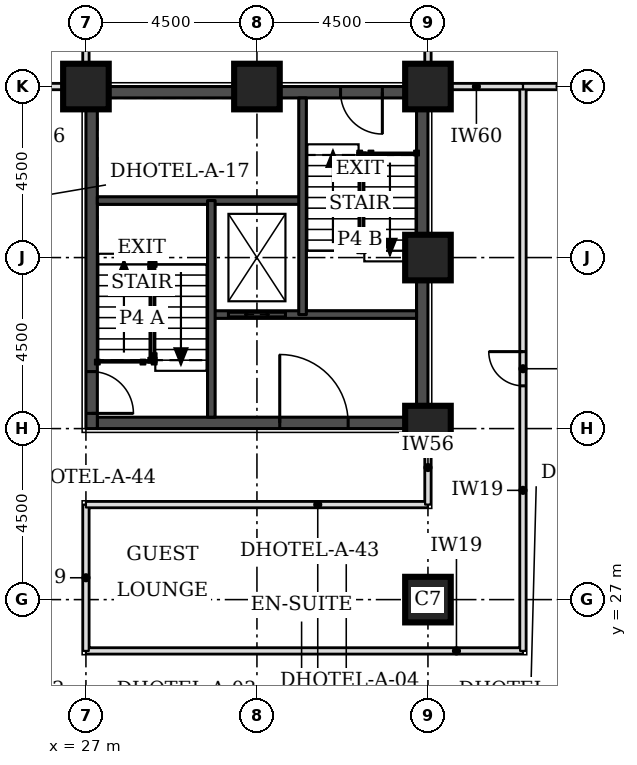
"""IFC4 building model, lengths in metres.
Left out: names, types, materials, properties, quantities, classifications, styles, units other than length and angle.
Written with IfcOpenShell. Run it as: python <this file> out.ifc"""

import sys

from ifc_helpers import new_model, si_unit, direction, frame, frame_2d, origin, origin_2d, place, context, subcontext, project, spatial, rectangle, extrude, element, fill, save


model = new_model("IFC4")
c1 = context("Model", 3, precision=1e-05, world=origin(), true_north=direction((0.0, 1.0)))
c2 = subcontext(c1, "Body", "Model", "MODEL_VIEW")
j1 = project(units=[si_unit("LENGTHUNIT", "METRE"), si_unit("PLANEANGLEUNIT", "RADIAN")], contexts=[c1])
p1 = place(None, origin())
s1 = spatial("IfcSite", under=j1, at=p1, CompositionType="ELEMENT")
p2 = place(p1, origin())
s2 = spatial("IfcBuilding", under=s1, at=p2, CompositionType="ELEMENT")
p3 = place(p2, frame((0.0, 0.0, 49.5)))
s3 = spatial("IfcBuildingStorey", under=s2, at=p3, CompositionType="ELEMENT", Elevation=49.5)
for number, where, z_axis, x_axis in (
    (1, (36.0, 27.0, 0.0), (0.0, 0.0, 1.0), (1.0, 0.0, 0.0)),
    (2, (36.0, 31.5, 0.0), (0.0, 0.0, 1.0), (1.0, 0.0, 0.0)),
    (3, (36.0, 36.0, 0.0), (0.0, 0.0, 1.0), (1.0, 0.0, 0.0)),
    (4, (27.0, 40.5, 0.0), (0.0, 0.0, 1.0), (1.0, 0.0, 0.0)),
    (5, (31.5, 40.5, 0.0), (0.0, 0.0, 1.0), (1.0, 0.0, 0.0)),
    (6, (36.0, 40.5, 0.0), (0.0, 0.0, 1.0), (1.0, 0.0, 0.0)),
):
    element("IfcColumn", number, at=place(p3, frame(where, z_axis=z_axis, x_axis=x_axis)), inside=s3, PredefinedType="COLUMN", context=c2, shape_type="SweptSolid", body=[
        extrude(rectangle(XDim=1.2, YDim=1.2, at=origin_2d()), origin(), (0.0, 0.0, 1.0), 3.3),
    ])
p4 = place(p3, frame((27.3, 31.65, 0.0), z_axis=(0.0, 0.0, 1.0), x_axis=(1.0, 0.0, 0.0)))
e7 = element("IfcWall", 7, at=p4, inside=s3, PredefinedType="SHEAR", context=c2, shape_type="SweptSolid", body=[
    extrude(rectangle(XDim=8.4, YDim=0.3, at=frame_2d((4.2, 0.0))), origin(), (0.0, 0.0, 1.0), 3.3),
])
p5 = place(p4, frame((4.8, 0.0, 0.0)))
e8 = element("IfcOpeningElement", 8, at=p5, cuts=e7, PredefinedType="OPENING", context=c2, shape_type="SweptSolid", body=[
    extrude(rectangle(XDim=1.8, YDim=2.1, at=frame_2d((0.9, 1.05))), frame((0.0, 0.16, 0.0), z_axis=(0.0, -1.0, 0.0), x_axis=(1.0, 0.0, 0.0)), (0.0, 0.0, 1.0), 0.32),
])
p6 = place(p3, frame((27.3, 40.35, 0.0), z_axis=(0.0, 0.0, 1.0), x_axis=(1.0, 0.0, 0.0)))
e9 = element("IfcWall", 9, at=p6, inside=s3, PredefinedType="SHEAR", context=c2, shape_type="SweptSolid", body=[
    extrude(rectangle(XDim=8.4, YDim=0.3, at=frame_2d((4.2, 0.0))), origin(), (0.0, 0.0, 1.0), 3.3),
])
p7 = place(p6, frame((6.4, 0.0, 0.0)))
e10 = element("IfcOpeningElement", 10, at=p7, cuts=e9, PredefinedType="OPENING", context=c2, shape_type="SweptSolid", body=[
    extrude(rectangle(XDim=1.1, YDim=2.1, at=frame_2d((0.55, 1.05))), frame((0.0, 0.16, 0.0), z_axis=(0.0, -1.0, 0.0), x_axis=(1.0, 0.0, 0.0)), (0.0, 0.0, 1.0), 0.32),
])
p8 = place(p3, frame((27.15, 31.5, 0.0), z_axis=(0.0, 0.0, 1.0), x_axis=(0.0, 1.0, 0.0)))
e11 = element("IfcWall", 11, at=p8, inside=s3, PredefinedType="SHEAR", context=c2, shape_type="SweptSolid", body=[
    extrude(rectangle(XDim=9.0, YDim=0.3, at=frame_2d((4.5, 0.0))), origin(), (0.0, 0.0, 1.0), 3.3),
])
p9 = place(p8, frame((0.4, 0.0, 0.0)))
e12 = element("IfcOpeningElement", 12, at=p9, cuts=e11, PredefinedType="OPENING", context=c2, shape_type="SweptSolid", body=[
    extrude(rectangle(XDim=1.1, YDim=2.1, at=frame_2d((0.55, 1.05))), frame((0.0, 0.16, 0.0), z_axis=(0.0, -1.0, 0.0), x_axis=(1.0, 0.0, 0.0)), (0.0, 0.0, 1.0), 0.32),
])
p10 = place(p3, frame((35.85, 31.5, 0.0), z_axis=(0.0, 0.0, 1.0), x_axis=(0.0, 1.0, 0.0)))
e13 = element("IfcWall", 13, at=p10, inside=s3, PredefinedType="SHEAR", context=c2, shape_type="SweptSolid", body=[
    extrude(rectangle(XDim=9.0, YDim=0.3, at=frame_2d((4.5, 0.0))), origin(), (0.0, 0.0, 1.0), 3.3),
])
p11 = place(p3, frame((27.0, 25.65, 0.0), z_axis=(0.0, 0.0, 1.0), x_axis=(1.0, 0.0, 0.0)))
e14 = element("IfcWall", 14, at=p11, inside=s3, PredefinedType="PARTITIONING", context=c2, shape_type="SweptSolid", body=[
    extrude(rectangle(XDim=11.5, YDim=0.15, at=frame_2d((5.75, 0.0))), origin(), (0.0, 0.0, 1.0), 3.08),
])
p12 = place(p3, frame((27.0, 25.65, 0.0), z_axis=(0.0, 0.0, 1.0), x_axis=(0.0, 1.0, 0.0)))
e15 = element("IfcWall", 15, at=p12, inside=s3, PredefinedType="PARTITIONING", context=c2, shape_type="SweptSolid", body=[
    extrude(rectangle(XDim=3.85, YDim=0.15, at=frame_2d((1.925, 0.0))), origin(), (0.0, 0.0, 1.0), 3.08),
])
p13 = place(p3, frame((38.5, 25.65, 0.0), z_axis=(0.0, 0.0, 1.0), x_axis=(0.0, 1.0, 0.0)))
e16 = element("IfcWall", 16, at=p13, inside=s3, PredefinedType="PARTITIONING", context=c2, shape_type="SweptSolid", body=[
    extrude(rectangle(XDim=14.85, YDim=0.15, at=frame_2d((7.425, 0.0))), origin(), (0.0, 0.0, 1.0), 3.08),
])
p14 = place(p13, frame((6.975, 0.0, 0.0)))
e17 = element("IfcOpeningElement", 17, at=p14, cuts=e16, PredefinedType="OPENING", context=c2, shape_type="SweptSolid", body=[
    extrude(rectangle(XDim=0.9, YDim=2.1, at=frame_2d((0.45, 1.05))), frame((0.0, 0.085, 0.0), z_axis=(0.0, -1.0, 0.0), x_axis=(1.0, 0.0, 0.0)), (0.0, 0.0, 1.0), 0.17),
])
p15 = place(p3, frame((27.0, 29.5, 0.0), z_axis=(0.0, 0.0, 1.0), x_axis=(1.0, 0.0, 0.0)))
e18 = element("IfcWall", 18, at=p15, inside=s3, PredefinedType="PARTITIONING", context=c2, shape_type="SweptSolid", body=[
    extrude(rectangle(XDim=9.0, YDim=0.15, at=frame_2d((4.5, 0.0))), origin(), (0.0, 0.0, 1.0), 3.08),
])
p16 = place(p3, frame((36.0, 29.5, 0.0), z_axis=(0.0, 0.0, 1.0), x_axis=(0.0, 1.0, 0.0)))
e19 = element("IfcWall", 19, at=p16, inside=s3, PredefinedType="PARTITIONING", context=c2, shape_type="SweptSolid", body=[
    extrude(rectangle(XDim=1.95, YDim=0.15, at=frame_2d((0.975, 0.0))), origin(), (0.0, 0.0, 1.0), 2.33),
])
p17 = place(p3, frame((24.6, 40.5, 0.0), z_axis=(0.0, 0.0, 1.0), x_axis=(1.0, 0.0, 0.0)))
e20 = element("IfcWall", 20, at=p17, inside=s3, PredefinedType="PARTITIONING", context=c2, shape_type="SweptSolid", body=[
    extrude(rectangle(XDim=2.35, YDim=0.15, at=frame_2d((1.175, 0.0))), origin(), (0.0, 0.0, 1.0), 2.33),
])
p18 = place(p3, frame((38.5, 40.5, 0.0), z_axis=(0.0, 0.0, 1.0), x_axis=(1.0, 0.0, 0.0)))
e21 = element("IfcWall", 21, at=p18, inside=s3, PredefinedType="PARTITIONING", context=c2, shape_type="SweptSolid", body=[
    extrude(rectangle(XDim=1.95, YDim=0.15, at=frame_2d((0.975, 0.0))), origin(), (0.0, 0.0, 1.0), 2.33),
])
p19 = place(p3, frame((27.0, 40.55, 0.0), z_axis=(0.0, 0.0, 1.0), x_axis=(0.0, 1.0, 0.0)))
e22 = element("IfcWall", 22, at=p19, inside=s3, PredefinedType="PARTITIONING", context=c2, shape_type="SweptSolid", body=[
    extrude(rectangle(XDim=2.45, YDim=0.15, at=frame_2d((1.225, 0.0))), origin(), (0.0, 0.0, 1.0), 3.08),
])
p20 = place(p3, frame((36.0, 40.55, 0.0), z_axis=(0.0, 0.0, 1.0), x_axis=(0.0, 1.0, 0.0)))
e23 = element("IfcWall", 23, at=p20, inside=s3, PredefinedType="PARTITIONING", context=c2, shape_type="SweptSolid", body=[
    extrude(rectangle(XDim=4.4, YDim=0.15, at=frame_2d((2.2, 0.0))), origin(), (0.0, 0.0, 1.0), 2.33),
])
p21 = place(p3, frame((36.05, 40.5, 0.0), z_axis=(0.0, 0.0, 1.0), x_axis=(1.0, 0.0, 0.0)))
e24 = element("IfcWall", 24, at=p21, inside=s3, PredefinedType="PARTITIONING", context=c2, shape_type="SweptSolid", body=[
    extrude(rectangle(XDim=2.45, YDim=0.15, at=frame_2d((1.225, 0.0))), origin(), (0.0, 0.0, 1.0), 2.33),
])
p22 = place(p3, frame((30.3, 34.5, 0.0), z_axis=(0.0, 0.0, 1.0), x_axis=(1.0, 0.0, 0.0)))
e25 = element("IfcWall", 25, at=p22, inside=s3, PredefinedType="SOLIDWALL", context=c2, shape_type="SweptSolid", body=[
    extrude(rectangle(XDim=5.4, YDim=0.2, at=frame_2d((2.7, 0.0))), origin(), (0.0, 0.0, 1.0), 3.08),
])
p23 = place(p22, frame((0.45, 0.0, 0.0)))
e26 = element("IfcOpeningElement", 26, at=p23, cuts=e25, PredefinedType="OPENING", context=c2, shape_type="SweptSolid", body=[
    extrude(rectangle(XDim=1.5, YDim=2.1, at=frame_2d((0.75, 1.05))), frame((0.0, 0.11, 0.0), z_axis=(0.0, -1.0, 0.0), x_axis=(1.0, 0.0, 0.0)), (0.0, 0.0, 1.0), 0.22),
])
p24 = place(p3, frame((27.3, 37.5, 0.0), z_axis=(0.0, 0.0, 1.0), x_axis=(1.0, 0.0, 0.0)))
e27 = element("IfcWall", 27, at=p24, inside=s3, PredefinedType="SOLIDWALL", context=c2, shape_type="SweptSolid", body=[
    extrude(rectangle(XDim=5.4, YDim=0.2, at=frame_2d((2.7, 0.0))), origin(), (0.0, 0.0, 1.0), 3.08),
])
for number, where, z_axis, x_axis in (
    (28, (30.3, 31.8, 0.0), (0.0, 0.0, 1.0), (0.0, 1.0, 0.0)),
    (29, (32.7, 34.5, 0.0), (0.0, 0.0, 1.0), (0.0, 1.0, 0.0)),
):
    element("IfcWall", number, at=place(p3, frame(where, z_axis=z_axis, x_axis=x_axis)), inside=s3, PredefinedType="SOLIDWALL", context=c2, shape_type="SweptSolid", body=[
        extrude(rectangle(XDim=5.7, YDim=0.2, at=frame_2d((2.85, 0.0))), origin(), (0.0, 0.0, 1.0), 3.08),
    ])
p25 = place(p14, origin())
e30 = element("IfcDoor", 30, at=p25, inside=s3, OperationType="SINGLE_SWING_RIGHT", PredefinedType="DOOR", context=c2, shape_type="SweptSolid", body=[
    extrude(rectangle(XDim=0.9, YDim=2.1, at=frame_2d((0.45, 1.05))), frame((0.0, 0.025, 0.0), z_axis=(0.0, -1.0, 0.0), x_axis=(1.0, 0.0, 0.0)), (0.0, 0.0, 1.0), 0.05),
])
fill(e17, e30)
p26 = place(p9, frame((1.1, 0.0, 0.0), z_axis=(0.0, 0.0, 1.0), x_axis=(-1.0, 0.0, 0.0)))
e31 = element("IfcDoor", 31, at=p26, inside=s3, OperationType="SINGLE_SWING_RIGHT", PredefinedType="DOOR", context=c2, shape_type="SweptSolid", body=[
    extrude(rectangle(XDim=1.1, YDim=2.1, at=frame_2d((0.55, 1.05))), frame((0.0, 0.025, 0.0), z_axis=(0.0, -1.0, 0.0), x_axis=(1.0, 0.0, 0.0)), (0.0, 0.0, 1.0), 0.05),
])
fill(e12, e31)
p27 = place(p7, frame((1.1, 0.0, 0.0), z_axis=(0.0, 0.0, 1.0), x_axis=(-1.0, 0.0, 0.0)))
e32 = element("IfcDoor", 32, at=p27, inside=s3, OperationType="SINGLE_SWING_LEFT", PredefinedType="DOOR", context=c2, shape_type="SweptSolid", body=[
    extrude(rectangle(XDim=1.1, YDim=2.1, at=frame_2d((0.55, 1.05))), frame((0.0, 0.025, 0.0), z_axis=(0.0, -1.0, 0.0), x_axis=(1.0, 0.0, 0.0)), (0.0, 0.0, 1.0), 0.05),
])
fill(e10, e32)
p28 = place(p23, origin())
e33 = element("IfcDoor", 33, at=p28, inside=s3, OperationType="DOUBLE_DOOR_SLIDING", PredefinedType="DOOR", context=c2, shape_type="SweptSolid", body=[
    extrude(rectangle(XDim=1.5, YDim=2.1, at=frame_2d((0.75, 1.05))), frame((0.0, 0.025, 0.0), z_axis=(0.0, -1.0, 0.0), x_axis=(1.0, 0.0, 0.0)), (0.0, 0.0, 1.0), 0.05),
])
fill(e26, e33)
p29 = place(p5, origin())
e34 = element("IfcDoor", 34, at=p29, inside=s3, OperationType="SINGLE_SWING_LEFT", PredefinedType="DOOR", context=c2, shape_type="SweptSolid", body=[
    extrude(rectangle(XDim=1.8, YDim=2.1, at=frame_2d((0.9, 1.05))), frame((0.0, 0.025, 0.0), z_axis=(0.0, -1.0, 0.0), x_axis=(1.0, 0.0, 0.0)), (0.0, 0.0, 1.0), 0.05),
])
fill(e8, e34)
save(model, sys.argv[1])
